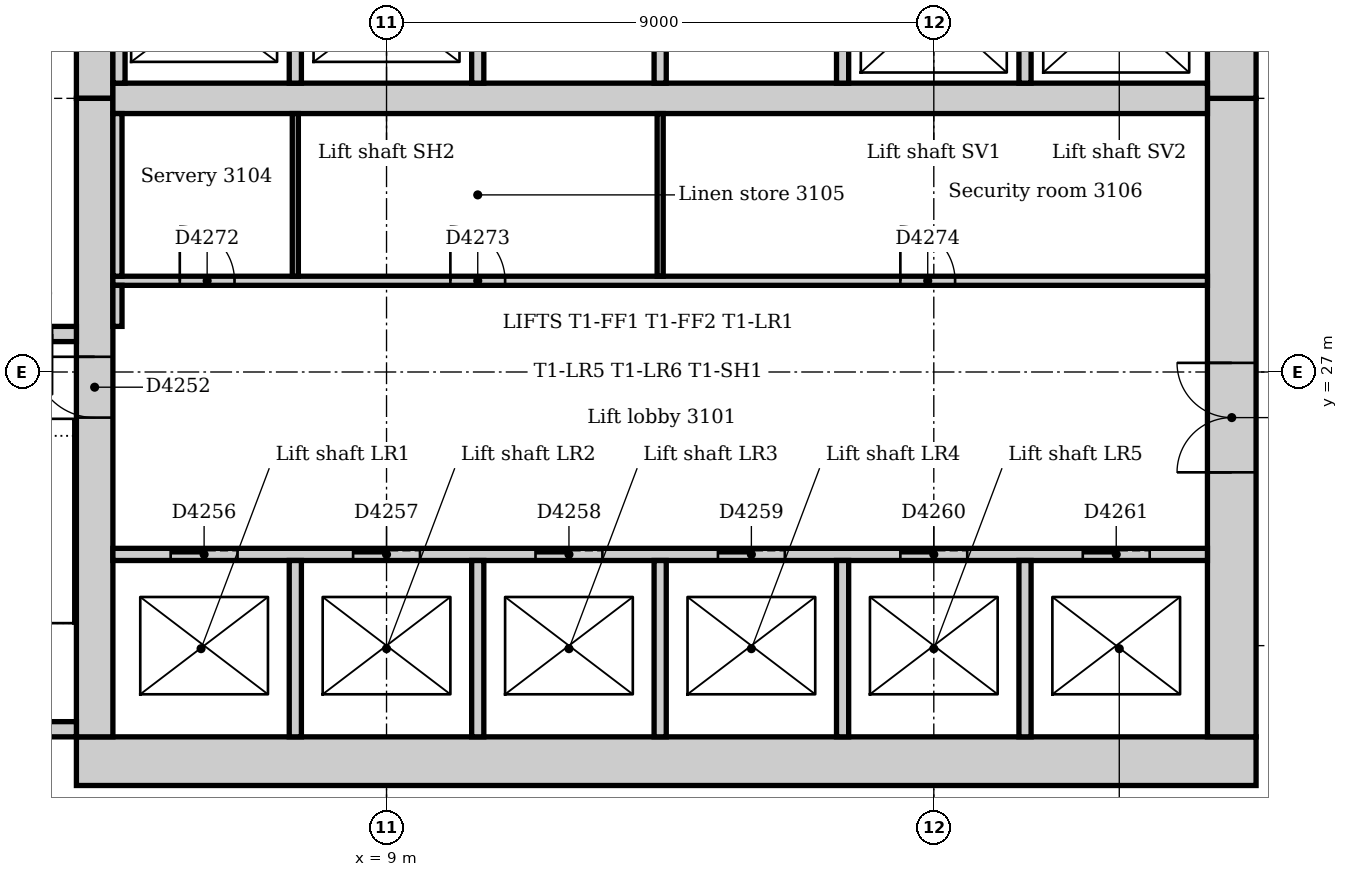
"""IFC4 building model, lengths in metres.
Left out: names, types, materials, properties, quantities, classifications, styles, units other than length and angle.
Written with IfcOpenShell. Run it as: python <this file> out.ifc"""

import sys

from ifc_helpers import new_model, si_unit, direction, frame, frame_2d, origin, place, context, subcontext, project, spatial, rectangle, extrude, element, fill, save


model = new_model("IFC4")
c1 = context("Model", 3, precision=1e-05, world=origin(), true_north=direction((0.0, 1.0)))
c2 = subcontext(c1, "Body", "Model", "MODEL_VIEW")
j1 = project(units=[si_unit("LENGTHUNIT", "METRE"), si_unit("PLANEANGLEUNIT", "RADIAN")], contexts=[c1])
p1 = place(None, origin())
s1 = spatial("IfcSite", under=j1, at=p1, CompositionType="ELEMENT")
p2 = place(p1, origin())
s2 = spatial("IfcBuilding", under=s1, at=p2, CompositionType="ELEMENT")
p3 = place(p2, frame((0.0, 0.0, 132.0)))
s3 = spatial("IfcBuildingStorey", under=s2, at=p3, CompositionType="ELEMENT", Elevation=132.0)
p4 = place(p3, frame((3.9, 20.6, 0.0), z_axis=(0.0, 0.0, 1.0), x_axis=(1.0, 0.0, 0.0)))
e1 = element("IfcWall", 1, at=p4, inside=s3, PredefinedType="SOLIDWALL", context=c2, shape_type="SweptSolid", body=[
    extrude(rectangle(XDim=19.4, YDim=0.8, at=frame_2d((9.7, 0.0))), origin(), (0.0, 0.0, 1.0), 4.0),
])
p5 = place(p3, frame((22.9, 21.0, 0.0), z_axis=(0.0, 0.0, 1.0), x_axis=(0.0, 1.0, 0.0)))
e2 = element("IfcWall", 2, at=p5, inside=s3, PredefinedType="SOLIDWALL", context=c2, shape_type="SweptSolid", body=[
    extrude(rectangle(XDim=10.5, YDim=0.8, at=frame_2d((5.25, 0.0))), origin(), (0.0, 0.0, 1.0), 4.0),
])
p6 = place(p5, frame((4.35, 0.0, 0.0)))
e3 = element("IfcOpeningElement", 3, at=p6, cuts=e2, PredefinedType="OPENING", context=c2, shape_type="SweptSolid", body=[
    extrude(rectangle(XDim=1.8, YDim=2.1, at=frame_2d((0.9, 1.05))), frame((0.0, 0.41, 0.0), z_axis=(0.0, -1.0, 0.0), x_axis=(1.0, 0.0, 0.0)), (0.0, 0.0, 1.0), 0.82),
])
p7 = place(p3, frame((22.9, 31.5, 0.0), z_axis=(0.0, 0.0, 1.0), x_axis=(0.0, 1.0, 0.0)))
e4 = element("IfcWall", 4, at=p7, inside=s3, PredefinedType="SOLIDWALL", context=c2, shape_type="SweptSolid", body=[
    extrude(rectangle(XDim=10.5, YDim=0.8, at=frame_2d((5.25, 0.0))), origin(), (0.0, 0.0, 1.0), 4.0),
])
p8 = place(p7, frame((3.15, 0.0, 0.0)))
e5 = element("IfcOpeningElement", 5, at=p8, cuts=e4, PredefinedType="OPENING", context=c2, shape_type="SweptSolid", body=[
    extrude(rectangle(XDim=1.0, YDim=2.1, at=frame_2d((0.5, 1.05))), frame((0.0, 0.41, 0.0), z_axis=(0.0, -1.0, 0.0), x_axis=(1.0, 0.0, 0.0)), (0.0, 0.0, 1.0), 0.82),
])
p9 = place(p7, frame((5.2, 0.0, 0.0)))
e6 = element("IfcOpeningElement", 6, at=p9, cuts=e4, PredefinedType="OPENING", context=c2, shape_type="SweptSolid", body=[
    extrude(rectangle(XDim=1.0, YDim=2.1, at=frame_2d((0.5, 1.05))), frame((0.0, 0.41, 0.0), z_axis=(0.0, -1.0, 0.0), x_axis=(1.0, 0.0, 0.0)), (0.0, 0.0, 1.0), 0.82),
])
p10 = place(p3, frame((4.2, 42.0, 0.0), z_axis=(0.0, 0.0, 1.0), x_axis=(0.0, -1.0, 0.0)))
e7 = element("IfcWall", 7, at=p10, inside=s3, PredefinedType="SOLIDWALL", context=c2, shape_type="SweptSolid", body=[
    extrude(rectangle(XDim=10.5, YDim=0.6, at=frame_2d((5.25, 0.0))), origin(), (0.0, 0.0, 1.0), 4.0),
])
p11 = place(p10, frame((5.3, 0.0, 0.0)))
e8 = element("IfcOpeningElement", 8, at=p11, cuts=e7, PredefinedType="OPENING", context=c2, shape_type="SweptSolid", body=[
    extrude(rectangle(XDim=1.0, YDim=2.1, at=frame_2d((0.5, 1.05))), frame((0.0, 0.31, 0.0), z_axis=(0.0, -1.0, 0.0), x_axis=(1.0, 0.0, 0.0)), (0.0, 0.0, 1.0), 0.62),
])
p12 = place(p3, frame((4.2, 31.5, 0.0), z_axis=(0.0, 0.0, 1.0), x_axis=(0.0, -1.0, 0.0)))
e9 = element("IfcWall", 9, at=p12, inside=s3, PredefinedType="SOLIDWALL", context=c2, shape_type="SweptSolid", body=[
    extrude(rectangle(XDim=10.5, YDim=0.6, at=frame_2d((5.25, 0.0))), origin(), (0.0, 0.0, 1.0), 4.0),
])
p13 = place(p12, frame((4.25, 0.0, 0.0)))
e10 = element("IfcOpeningElement", 10, at=p13, cuts=e9, PredefinedType="OPENING", context=c2, shape_type="SweptSolid", body=[
    extrude(rectangle(XDim=1.0, YDim=2.1, at=frame_2d((0.5, 1.05))), frame((0.0, 0.31, 0.0), z_axis=(0.0, -1.0, 0.0), x_axis=(1.0, 0.0, 0.0)), (0.0, 0.0, 1.0), 0.62),
])
p14 = place(p3, frame((4.5, 31.5, 0.0), z_axis=(0.0, 0.0, 1.0), x_axis=(1.0, 0.0, 0.0)))
e11 = element("IfcWall", 11, at=p14, inside=s3, PredefinedType="SOLIDWALL", context=c2, shape_type="SweptSolid", body=[
    extrude(rectangle(XDim=18.0, YDim=0.5, at=frame_2d((9.0, 0.0))), origin(), (0.0, 0.0, 1.0), 4.0),
])
p15 = place(p3, frame((0.36, 21.125, 0.0), z_axis=(0.0, 0.0, 1.0), x_axis=(1.0, 0.0, 0.0)))
e12 = element("IfcWall", 12, at=p15, inside=s3, PredefinedType="SOLIDWALL", context=c2, shape_type="SweptSolid", body=[
    extrude(rectangle(XDim=3.54, YDim=0.25, at=frame_2d((1.77, 0.0))), origin(), (0.0, 0.0, 1.0), 4.0),
])
p16 = place(p3, frame((3.9, 27.625, 0.0), z_axis=(0.0, 0.0, 1.0), x_axis=(-1.0, 0.0, 0.0)))
e13 = element("IfcWall", 13, at=p16, inside=s3, PredefinedType="SOLIDWALL", context=c2, shape_type="SweptSolid", body=[
    extrude(rectangle(XDim=3.54, YDim=0.25, at=frame_2d((1.77, 0.0))), origin(), (0.0, 0.0, 1.0), 4.0),
])
p17 = place(p16, frame((0.4, 0.0, 0.0)))
e14 = element("IfcOpeningElement", 14, at=p17, cuts=e13, PredefinedType="OPENING", context=c2, shape_type="SweptSolid", body=[
    extrude(rectangle(XDim=1.0, YDim=2.1, at=frame_2d((0.5, 1.05))), frame((0.0, 0.135, 0.0), z_axis=(0.0, -1.0, 0.0), x_axis=(1.0, 0.0, 0.0)), (0.0, 0.0, 1.0), 0.27),
])
p18 = place(p3, frame((4.5, 24.0, 0.0), z_axis=(0.0, 0.0, 1.0), x_axis=(1.0, 0.0, 0.0)))
e15 = element("IfcWall", 15, at=p18, inside=s3, PredefinedType="PARTITIONING", context=c2, shape_type="SweptSolid", body=[
    extrude(rectangle(XDim=18.0, YDim=0.2, at=frame_2d((9.0, 0.0))), origin(), (0.0, 0.0, 1.0), 3.85),
])
p19 = place(p18, frame((0.95, 0.0, 0.0)))
e16 = element("IfcOpeningElement", 16, at=p19, cuts=e15, PredefinedType="OPENING", context=c2, shape_type="SweptSolid", body=[
    extrude(rectangle(XDim=1.1, YDim=2.1, at=frame_2d((0.55, 1.05))), frame((0.0, 0.11, 0.0), z_axis=(0.0, -1.0, 0.0), x_axis=(1.0, 0.0, 0.0)), (0.0, 0.0, 1.0), 0.22),
])
p20 = place(p18, frame((3.95, 0.0, 0.0)))
e17 = element("IfcOpeningElement", 17, at=p20, cuts=e15, PredefinedType="OPENING", context=c2, shape_type="SweptSolid", body=[
    extrude(rectangle(XDim=1.1, YDim=2.1, at=frame_2d((0.55, 1.05))), frame((0.0, 0.11, 0.0), z_axis=(0.0, -1.0, 0.0), x_axis=(1.0, 0.0, 0.0)), (0.0, 0.0, 1.0), 0.22),
])
p21 = place(p18, frame((6.95, 0.0, 0.0)))
e18 = element("IfcOpeningElement", 18, at=p21, cuts=e15, PredefinedType="OPENING", context=c2, shape_type="SweptSolid", body=[
    extrude(rectangle(XDim=1.1, YDim=2.1, at=frame_2d((0.55, 1.05))), frame((0.0, 0.11, 0.0), z_axis=(0.0, -1.0, 0.0), x_axis=(1.0, 0.0, 0.0)), (0.0, 0.0, 1.0), 0.22),
])
p22 = place(p18, frame((9.95, 0.0, 0.0)))
e19 = element("IfcOpeningElement", 19, at=p22, cuts=e15, PredefinedType="OPENING", context=c2, shape_type="SweptSolid", body=[
    extrude(rectangle(XDim=1.1, YDim=2.1, at=frame_2d((0.55, 1.05))), frame((0.0, 0.11, 0.0), z_axis=(0.0, -1.0, 0.0), x_axis=(1.0, 0.0, 0.0)), (0.0, 0.0, 1.0), 0.22),
])
p23 = place(p18, frame((12.95, 0.0, 0.0)))
e20 = element("IfcOpeningElement", 20, at=p23, cuts=e15, PredefinedType="OPENING", context=c2, shape_type="SweptSolid", body=[
    extrude(rectangle(XDim=1.1, YDim=2.1, at=frame_2d((0.55, 1.05))), frame((0.0, 0.11, 0.0), z_axis=(0.0, -1.0, 0.0), x_axis=(1.0, 0.0, 0.0)), (0.0, 0.0, 1.0), 0.22),
])
p24 = place(p18, frame((15.95, 0.0, 0.0)))
e21 = element("IfcOpeningElement", 21, at=p24, cuts=e15, PredefinedType="OPENING", context=c2, shape_type="SweptSolid", body=[
    extrude(rectangle(XDim=1.1, YDim=2.1, at=frame_2d((0.55, 1.05))), frame((0.0, 0.11, 0.0), z_axis=(0.0, -1.0, 0.0), x_axis=(1.0, 0.0, 0.0)), (0.0, 0.0, 1.0), 0.22),
])
p25 = place(p3, frame((4.6, 31.75, 0.0), z_axis=(0.0, 0.0, 1.0), x_axis=(0.0, 1.0, 0.0)))
e22 = element("IfcWall", 22, at=p25, inside=s3, PredefinedType="PARTITIONING", context=c2, shape_type="SweptSolid", body=[
    extrude(rectangle(XDim=2.65, YDim=0.2, at=frame_2d((1.325, 0.0))), origin(), (0.0, 0.0, 1.0), 3.85),
])
p26 = place(p3, frame((7.5, 21.0, 0.0), z_axis=(0.0, 0.0, 1.0), x_axis=(0.0, 1.0, 0.0)))
e23 = element("IfcWall", 23, at=p26, inside=s3, PredefinedType="PARTITIONING", context=c2, shape_type="SweptSolid", body=[
    extrude(rectangle(XDim=2.9, YDim=0.2, at=frame_2d((1.45, 0.0))), origin(), (0.0, 0.0, 1.0), 3.85),
])
p27 = place(p3, frame((7.5, 31.75, 0.0), z_axis=(0.0, 0.0, 1.0), x_axis=(0.0, 1.0, 0.0)))
e24 = element("IfcWall", 24, at=p27, inside=s3, PredefinedType="PARTITIONING", context=c2, shape_type="SweptSolid", body=[
    extrude(rectangle(XDim=2.65, YDim=0.2, at=frame_2d((1.325, 0.0))), origin(), (0.0, 0.0, 1.0), 3.85),
])
p28 = place(p3, frame((10.5, 21.0, 0.0), z_axis=(0.0, 0.0, 1.0), x_axis=(0.0, 1.0, 0.0)))
e25 = element("IfcWall", 25, at=p28, inside=s3, PredefinedType="PARTITIONING", context=c2, shape_type="SweptSolid", body=[
    extrude(rectangle(XDim=2.9, YDim=0.2, at=frame_2d((1.45, 0.0))), origin(), (0.0, 0.0, 1.0), 3.85),
])
p29 = place(p3, frame((10.5, 31.75, 0.0), z_axis=(0.0, 0.0, 1.0), x_axis=(0.0, 1.0, 0.0)))
e26 = element("IfcWall", 26, at=p29, inside=s3, PredefinedType="PARTITIONING", context=c2, shape_type="SweptSolid", body=[
    extrude(rectangle(XDim=2.65, YDim=0.2, at=frame_2d((1.325, 0.0))), origin(), (0.0, 0.0, 1.0), 3.85),
])
p30 = place(p3, frame((13.5, 21.0, 0.0), z_axis=(0.0, 0.0, 1.0), x_axis=(0.0, 1.0, 0.0)))
e27 = element("IfcWall", 27, at=p30, inside=s3, PredefinedType="PARTITIONING", context=c2, shape_type="SweptSolid", body=[
    extrude(rectangle(XDim=2.9, YDim=0.2, at=frame_2d((1.45, 0.0))), origin(), (0.0, 0.0, 1.0), 3.85),
])
p31 = place(p3, frame((13.5, 31.75, 0.0), z_axis=(0.0, 0.0, 1.0), x_axis=(0.0, 1.0, 0.0)))
e28 = element("IfcWall", 28, at=p31, inside=s3, PredefinedType="PARTITIONING", context=c2, shape_type="SweptSolid", body=[
    extrude(rectangle(XDim=2.65, YDim=0.2, at=frame_2d((1.325, 0.0))), origin(), (0.0, 0.0, 1.0), 3.85),
])
p32 = place(p3, frame((16.5, 21.0, 0.0), z_axis=(0.0, 0.0, 1.0), x_axis=(0.0, 1.0, 0.0)))
e29 = element("IfcWall", 29, at=p32, inside=s3, PredefinedType="PARTITIONING", context=c2, shape_type="SweptSolid", body=[
    extrude(rectangle(XDim=2.9, YDim=0.2, at=frame_2d((1.45, 0.0))), origin(), (0.0, 0.0, 1.0), 3.85),
])
p33 = place(p3, frame((16.5, 31.75, 0.0), z_axis=(0.0, 0.0, 1.0), x_axis=(0.0, 1.0, 0.0)))
e30 = element("IfcWall", 30, at=p33, inside=s3, PredefinedType="PARTITIONING", context=c2, shape_type="SweptSolid", body=[
    extrude(rectangle(XDim=2.65, YDim=0.2, at=frame_2d((1.325, 0.0))), origin(), (0.0, 0.0, 1.0), 3.85),
])
p34 = place(p3, frame((19.5, 21.0, 0.0), z_axis=(0.0, 0.0, 1.0), x_axis=(0.0, 1.0, 0.0)))
e31 = element("IfcWall", 31, at=p34, inside=s3, PredefinedType="PARTITIONING", context=c2, shape_type="SweptSolid", body=[
    extrude(rectangle(XDim=2.9, YDim=0.2, at=frame_2d((1.45, 0.0))), origin(), (0.0, 0.0, 1.0), 3.85),
])
p35 = place(p3, frame((19.5, 31.75, 0.0), z_axis=(0.0, 0.0, 1.0), x_axis=(0.0, 1.0, 0.0)))
e32 = element("IfcWall", 32, at=p35, inside=s3, PredefinedType="PARTITIONING", context=c2, shape_type="SweptSolid", body=[
    extrude(rectangle(XDim=2.65, YDim=0.2, at=frame_2d((1.325, 0.0))), origin(), (0.0, 0.0, 1.0), 3.85),
])
p36 = place(p3, frame((4.5, 28.5, 0.0), z_axis=(0.0, 0.0, 1.0), x_axis=(1.0, 0.0, 0.0)))
e33 = element("IfcWall", 33, at=p36, inside=s3, PredefinedType="PARTITIONING", context=c2, shape_type="SweptSolid", body=[
    extrude(rectangle(XDim=18.0, YDim=0.15, at=frame_2d((9.0, 0.0))), origin(), (0.0, 0.0, 1.0), 3.85),
])
p37 = place(p36, frame((1.1, 0.0, 0.0)))
e34 = element("IfcOpeningElement", 34, at=p37, cuts=e33, PredefinedType="OPENING", context=c2, shape_type="SweptSolid", body=[
    extrude(rectangle(XDim=0.9, YDim=2.1, at=frame_2d((0.45, 1.05))), frame((0.0, 0.085, 0.0), z_axis=(0.0, -1.0, 0.0), x_axis=(1.0, 0.0, 0.0)), (0.0, 0.0, 1.0), 0.17),
])
p38 = place(p36, frame((5.55, 0.0, 0.0)))
e35 = element("IfcOpeningElement", 35, at=p38, cuts=e33, PredefinedType="OPENING", context=c2, shape_type="SweptSolid", body=[
    extrude(rectangle(XDim=0.9, YDim=2.1, at=frame_2d((0.45, 1.05))), frame((0.0, 0.085, 0.0), z_axis=(0.0, -1.0, 0.0), x_axis=(1.0, 0.0, 0.0)), (0.0, 0.0, 1.0), 0.17),
])
p39 = place(p36, frame((12.95, 0.0, 0.0)))
e36 = element("IfcOpeningElement", 36, at=p39, cuts=e33, PredefinedType="OPENING", context=c2, shape_type="SweptSolid", body=[
    extrude(rectangle(XDim=0.9, YDim=2.1, at=frame_2d((0.45, 1.05))), frame((0.0, 0.085, 0.0), z_axis=(0.0, -1.0, 0.0), x_axis=(1.0, 0.0, 0.0)), (0.0, 0.0, 1.0), 0.17),
])
p40 = place(p3, frame((4.575, 27.75, 0.0), z_axis=(0.0, 0.0, 1.0), x_axis=(0.0, 1.0, 0.0)))
e37 = element("IfcWall", 37, at=p40, inside=s3, PredefinedType="PARTITIONING", context=c2, shape_type="SweptSolid", body=[
    extrude(rectangle(XDim=0.675, YDim=0.15, at=frame_2d((0.338, 0.0))), origin(), (0.0, 0.0, 1.0), 3.85),
])
p41 = place(p3, frame((4.575, 28.575, 0.0), z_axis=(0.0, 0.0, 1.0), x_axis=(0.0, 1.0, 0.0)))
e38 = element("IfcWall", 38, at=p41, inside=s3, PredefinedType="PARTITIONING", context=c2, shape_type="SweptSolid", body=[
    extrude(rectangle(XDim=2.675, YDim=0.15, at=frame_2d((1.337, 0.0))), origin(), (0.0, 0.0, 1.0), 3.85),
])
for number, where, z_axis, x_axis in (
    (39, (7.5, 28.575, 0.0), (0.0, 0.0, 1.0), (0.0, 1.0, 0.0)),
    (40, (13.5, 28.575, 0.0), (0.0, 0.0, 1.0), (0.0, 1.0, 0.0)),
):
    element("IfcWall", number, at=place(p3, frame(where, z_axis=z_axis, x_axis=x_axis)), inside=s3, PredefinedType="PARTITIONING", context=c2, shape_type="SweptSolid", body=[
        extrude(rectangle(XDim=2.675, YDim=0.1, at=frame_2d((1.337, 0.0))), origin(), (0.0, 0.0, 1.0), 3.85),
    ])
p42 = place(p13, frame((1.0, 0.0, 0.0), z_axis=(0.0, 0.0, 1.0), x_axis=(-1.0, 0.0, 0.0)))
e41 = element("IfcDoor", 41, at=p42, inside=s3, OperationType="SINGLE_SWING_RIGHT", PredefinedType="DOOR", context=c2, shape_type="SweptSolid", body=[
    extrude(rectangle(XDim=1.0, YDim=2.1, at=frame_2d((0.5, 1.05))), frame((0.0, 0.025, 0.0), z_axis=(0.0, -1.0, 0.0), x_axis=(1.0, 0.0, 0.0)), (0.0, 0.0, 1.0), 0.05),
])
fill(e10, e41)
p43 = place(p19, origin())
e42 = element("IfcDoor", 42, at=p43, inside=s3, OperationType="SLIDING_TO_LEFT", PredefinedType="DOOR", context=c2, shape_type="SweptSolid", body=[
    extrude(rectangle(XDim=1.1, YDim=2.1, at=frame_2d((0.55, 1.05))), frame((0.0, 0.025, 0.0), z_axis=(0.0, -1.0, 0.0), x_axis=(1.0, 0.0, 0.0)), (0.0, 0.0, 1.0), 0.05),
])
fill(e16, e42)
p44 = place(p20, origin())
e43 = element("IfcDoor", 43, at=p44, inside=s3, OperationType="SLIDING_TO_LEFT", PredefinedType="DOOR", context=c2, shape_type="SweptSolid", body=[
    extrude(rectangle(XDim=1.1, YDim=2.1, at=frame_2d((0.55, 1.05))), frame((0.0, 0.025, 0.0), z_axis=(0.0, -1.0, 0.0), x_axis=(1.0, 0.0, 0.0)), (0.0, 0.0, 1.0), 0.05),
])
fill(e17, e43)
p45 = place(p21, origin())
e44 = element("IfcDoor", 44, at=p45, inside=s3, OperationType="SLIDING_TO_LEFT", PredefinedType="DOOR", context=c2, shape_type="SweptSolid", body=[
    extrude(rectangle(XDim=1.1, YDim=2.1, at=frame_2d((0.55, 1.05))), frame((0.0, 0.025, 0.0), z_axis=(0.0, -1.0, 0.0), x_axis=(1.0, 0.0, 0.0)), (0.0, 0.0, 1.0), 0.05),
])
fill(e18, e44)
p46 = place(p22, origin())
e45 = element("IfcDoor", 45, at=p46, inside=s3, OperationType="SLIDING_TO_LEFT", PredefinedType="DOOR", context=c2, shape_type="SweptSolid", body=[
    extrude(rectangle(XDim=1.1, YDim=2.1, at=frame_2d((0.55, 1.05))), frame((0.0, 0.025, 0.0), z_axis=(0.0, -1.0, 0.0), x_axis=(1.0, 0.0, 0.0)), (0.0, 0.0, 1.0), 0.05),
])
fill(e19, e45)
p47 = place(p23, origin())
e46 = element("IfcDoor", 46, at=p47, inside=s3, OperationType="SLIDING_TO_LEFT", PredefinedType="DOOR", context=c2, shape_type="SweptSolid", body=[
    extrude(rectangle(XDim=1.1, YDim=2.1, at=frame_2d((0.55, 1.05))), frame((0.0, 0.025, 0.0), z_axis=(0.0, -1.0, 0.0), x_axis=(1.0, 0.0, 0.0)), (0.0, 0.0, 1.0), 0.05),
])
fill(e20, e46)
p48 = place(p24, origin())
e47 = element("IfcDoor", 47, at=p48, inside=s3, OperationType="SLIDING_TO_LEFT", PredefinedType="DOOR", context=c2, shape_type="SweptSolid", body=[
    extrude(rectangle(XDim=1.1, YDim=2.1, at=frame_2d((0.55, 1.05))), frame((0.0, 0.025, 0.0), z_axis=(0.0, -1.0, 0.0), x_axis=(1.0, 0.0, 0.0)), (0.0, 0.0, 1.0), 0.05),
])
fill(e21, e47)
p49 = place(p6, origin())
e48 = element("IfcDoor", 48, at=p49, inside=s3, OperationType="DOUBLE_DOOR_DOUBLE_SWING", PredefinedType="DOOR", context=c2, shape_type="SweptSolid", body=[
    extrude(rectangle(XDim=1.8, YDim=2.1, at=frame_2d((0.9, 1.05))), frame((0.0, 0.025, 0.0), z_axis=(0.0, -1.0, 0.0), x_axis=(1.0, 0.0, 0.0)), (0.0, 0.0, 1.0), 0.05),
])
fill(e3, e48)
p50 = place(p37, origin())
e49 = element("IfcDoor", 49, at=p50, inside=s3, OperationType="SINGLE_SWING_LEFT", PredefinedType="DOOR", context=c2, shape_type="SweptSolid", body=[
    extrude(rectangle(XDim=0.9, YDim=2.1, at=frame_2d((0.45, 1.05))), frame((0.0, 0.025, 0.0), z_axis=(0.0, -1.0, 0.0), x_axis=(1.0, 0.0, 0.0)), (0.0, 0.0, 1.0), 0.05),
])
fill(e34, e49)
p51 = place(p38, origin())
e50 = element("IfcDoor", 50, at=p51, inside=s3, OperationType="SINGLE_SWING_LEFT", PredefinedType="DOOR", context=c2, shape_type="SweptSolid", body=[
    extrude(rectangle(XDim=0.9, YDim=2.1, at=frame_2d((0.45, 1.05))), frame((0.0, 0.025, 0.0), z_axis=(0.0, -1.0, 0.0), x_axis=(1.0, 0.0, 0.0)), (0.0, 0.0, 1.0), 0.05),
])
fill(e35, e50)
p52 = place(p39, origin())
e51 = element("IfcDoor", 51, at=p52, inside=s3, OperationType="SINGLE_SWING_LEFT", PredefinedType="DOOR", context=c2, shape_type="SweptSolid", body=[
    extrude(rectangle(XDim=0.9, YDim=2.1, at=frame_2d((0.45, 1.05))), frame((0.0, 0.025, 0.0), z_axis=(0.0, -1.0, 0.0), x_axis=(1.0, 0.0, 0.0)), (0.0, 0.0, 1.0), 0.05),
])
fill(e36, e51)
save(model, sys.argv[1])
